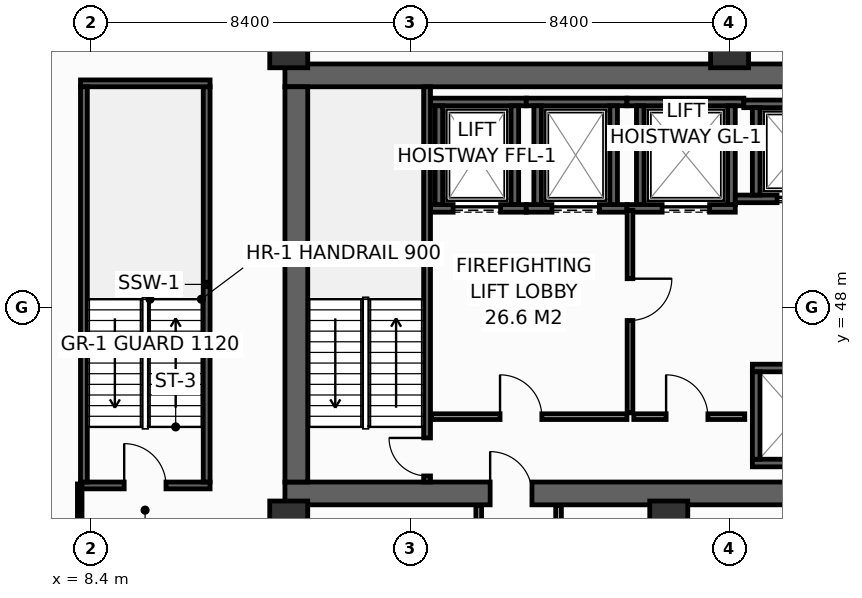
"""IFC4 building model, lengths in metres.
Left out: names, types, materials, properties, quantities, classifications, styles, units other than length and angle.
Written with IfcOpenShell. Run it as: python <this file> out.ifc"""

import sys

from ifc_helpers import new_model, si_unit, direction, frame, frame_2d, origin, origin_2d, place, context, subcontext, project, spatial, rectangle, hollow_rectangle, extrude, element, fill, save


model = new_model("IFC4")
c1 = context("Model", 3, precision=1e-05, world=origin(), true_north=direction((0.0, 1.0)))
c2 = subcontext(c1, "Body", "Model", "MODEL_VIEW")
j1 = project(units=[si_unit("LENGTHUNIT", "METRE"), si_unit("PLANEANGLEUNIT", "RADIAN")], contexts=[c1])
p1 = place(None, origin())
s1 = spatial("IfcSite", under=j1, at=p1, CompositionType="ELEMENT")
p2 = place(p1, origin())
s2 = spatial("IfcBuilding", under=s1, at=p2, CompositionType="ELEMENT")
p3 = place(p2, frame((0.0, 0.0, 114.8)))
s3 = spatial("IfcBuildingStorey", under=s2, at=p3, CompositionType="ELEMENT", Elevation=114.8)
p4 = place(p3, frame((13.5, 43.1, 0.0), z_axis=(0.0, 0.0, 1.0), x_axis=(1.0, 0.0, 0.0)))
e1 = element("IfcWall", 1, at=p4, inside=s3, PredefinedType="SHEAR", context=c2, shape_type="SweptSolid", body=[
    extrude(rectangle(XDim=32.9, YDim=0.6, at=frame_2d((16.45, 0.0))), origin(), (0.0, 0.0, 1.0), 4.15),
])
p5 = place(p4, frame((5.4, 0.0, 0.0)))
e2 = element("IfcOpeningElement", 2, at=p5, cuts=e1, PredefinedType="OPENING", context=c2, shape_type="SweptSolid", body=[
    extrude(rectangle(XDim=1.1, YDim=2.15, at=frame_2d((0.55, 1.075))), frame((0.0, 0.31, 0.0), z_axis=(0.0, -1.0, 0.0), x_axis=(1.0, 0.0, 0.0)), (0.0, 0.0, 1.0), 0.62),
])
p6 = place(p4, frame((25.6, 0.0, 0.0)))
e3 = element("IfcOpeningElement", 3, at=p6, cuts=e1, PredefinedType="OPENING", context=c2, shape_type="SweptSolid", body=[
    extrude(rectangle(XDim=1.1, YDim=2.15, at=frame_2d((0.55, 1.075))), frame((0.0, 0.31, 0.0), z_axis=(0.0, -1.0, 0.0), x_axis=(1.0, 0.0, 0.0)), (0.0, 0.0, 1.0), 0.62),
])
p7 = place(p3, frame((13.5, 54.1, 0.0), z_axis=(0.0, 0.0, 1.0), x_axis=(1.0, 0.0, 0.0)))
e4 = element("IfcWall", 4, at=p7, inside=s3, PredefinedType="SHEAR", context=c2, shape_type="SweptSolid", body=[
    extrude(rectangle(XDim=32.9, YDim=0.6, at=frame_2d((16.45, 0.0))), origin(), (0.0, 0.0, 1.0), 4.15),
])
p8 = place(p3, frame((13.8, 43.4, 0.0), z_axis=(0.0, 0.0, 1.0), x_axis=(0.0, 1.0, 0.0)))
e5 = element("IfcWall", 5, at=p8, inside=s3, PredefinedType="SHEAR", context=c2, shape_type="SweptSolid", body=[
    extrude(rectangle(XDim=10.4, YDim=0.6, at=frame_2d((5.2, 0.0))), origin(), (0.0, 0.0, 1.0), 4.15),
])
for number, where, z_axis, x_axis in (
    (6, (13.6, 54.8, 0.0), (0.0, 0.0, 1.0), (1.0, 0.0, 0.0)),
    (7, (25.2, 54.8, 0.0), (0.0, 0.0, 1.0), (1.0, 0.0, 0.0)),
    (8, (13.6, 42.4, 0.0), (0.0, 0.0, 1.0), (1.0, 0.0, 0.0)),
    (9, (23.6, 42.4, 0.0), (0.0, 0.0, 1.0), (1.0, 0.0, 0.0)),
):
    element("IfcColumn", number, at=place(p3, frame(where, z_axis=z_axis, x_axis=x_axis)), inside=s3, PredefinedType="COLUMN", context=c2, shape_type="SweptSolid", body=[
        extrude(hollow_rectangle(XDim=1.0, YDim=1.0, WallThickness=0.045, at=origin_2d()), origin(), (0.0, 0.0, 1.0), 4.4),
    ])
p9 = place(p3, frame((17.33, 50.6, 0.0), z_axis=(0.0, 0.0, 1.0), x_axis=(1.0, 0.0, 0.0)))
e10 = element("IfcWall", 10, at=p9, inside=s3, PredefinedType="SHEAR", context=c2, shape_type="SweptSolid", body=[
    extrude(rectangle(XDim=2.52, YDim=0.2, at=frame_2d((1.26, 0.0))), origin(), (0.0, 0.0, 1.0), 4.15),
])
p10 = place(p9, frame((0.595, 0.0, 0.0)))
e11 = element("IfcOpeningElement", 11, at=p10, cuts=e10, PredefinedType="OPENING", context=c2, shape_type="SweptSolid", body=[
    extrude(rectangle(XDim=1.25, YDim=2.3, at=frame_2d((0.625, 1.15))), frame((0.0, 0.11, 0.0), z_axis=(0.0, -1.0, 0.0), x_axis=(1.0, 0.0, 0.0)), (0.0, 0.0, 1.0), 0.22),
])
p11 = place(p3, frame((17.33, 53.4, 0.0), z_axis=(0.0, 0.0, 1.0), x_axis=(1.0, 0.0, 0.0)))
e12 = element("IfcWall", 12, at=p11, inside=s3, PredefinedType="SHEAR", context=c2, shape_type="SweptSolid", body=[
    extrude(rectangle(XDim=2.52, YDim=0.2, at=frame_2d((1.26, 0.0))), origin(), (0.0, 0.0, 1.0), 4.15),
])
for number, where, z_axis, x_axis in (
    (13, (17.55, 50.7, 0.0), (0.0, 0.0, 1.0), (0.0, 1.0, 0.0)),
    (14, (19.55, 50.7, 0.0), (0.0, 0.0, 1.0), (0.0, 1.0, 0.0)),
):
    element("IfcWall", number, at=place(p3, frame(where, z_axis=z_axis, x_axis=x_axis)), inside=s3, PredefinedType="SHEAR", context=c2, shape_type="SweptSolid", body=[
        extrude(rectangle(XDim=2.6, YDim=0.2, at=frame_2d((1.3, 0.0))), origin(), (0.0, 0.0, 1.0), 4.15),
    ])
p12 = place(p3, frame((19.85, 50.6, 0.0), z_axis=(0.0, 0.0, 1.0), x_axis=(1.0, 0.0, 0.0)))
e15 = element("IfcWall", 15, at=p12, inside=s3, PredefinedType="SHEAR", context=c2, shape_type="SweptSolid", body=[
    extrude(rectangle(XDim=2.65, YDim=0.2, at=frame_2d((1.325, 0.0))), origin(), (0.0, 0.0, 1.0), 4.15),
])
p13 = place(p12, frame((0.675, 0.0, 0.0)))
e16 = element("IfcOpeningElement", 16, at=p13, cuts=e15, PredefinedType="OPENING", context=c2, shape_type="SweptSolid", body=[
    extrude(rectangle(XDim=1.25, YDim=2.3, at=frame_2d((0.625, 1.15))), frame((0.0, 0.11, 0.0), z_axis=(0.0, -1.0, 0.0), x_axis=(1.0, 0.0, 0.0)), (0.0, 0.0, 1.0), 0.22),
])
p14 = place(p3, frame((19.85, 53.4, 0.0), z_axis=(0.0, 0.0, 1.0), x_axis=(1.0, 0.0, 0.0)))
e17 = element("IfcWall", 17, at=p14, inside=s3, PredefinedType="SHEAR", context=c2, shape_type="SweptSolid", body=[
    extrude(rectangle(XDim=2.65, YDim=0.2, at=frame_2d((1.325, 0.0))), origin(), (0.0, 0.0, 1.0), 4.15),
])
for number, where, z_axis, x_axis in (
    (18, (20.15, 50.7, 0.0), (0.0, 0.0, 1.0), (0.0, 1.0, 0.0)),
    (19, (22.15, 50.7, 0.0), (0.0, 0.0, 1.0), (0.0, 1.0, 0.0)),
):
    element("IfcWall", number, at=place(p3, frame(where, z_axis=z_axis, x_axis=x_axis)), inside=s3, PredefinedType="SHEAR", context=c2, shape_type="SweptSolid", body=[
        extrude(rectangle(XDim=2.6, YDim=0.2, at=frame_2d((1.3, 0.0))), origin(), (0.0, 0.0, 1.0), 4.15),
    ])
p15 = place(p3, frame((22.5, 50.6, 0.0), z_axis=(0.0, 0.0, 1.0), x_axis=(1.0, 0.0, 0.0)))
e20 = element("IfcWall", 20, at=p15, inside=s3, PredefinedType="SHEAR", context=c2, shape_type="SweptSolid", body=[
    extrude(rectangle(XDim=2.85, YDim=0.2, at=frame_2d((1.425, 0.0))), origin(), (0.0, 0.0, 1.0), 4.15),
])
p16 = place(p15, frame((0.925, 0.0, 0.0)))
e21 = element("IfcOpeningElement", 21, at=p16, cuts=e20, PredefinedType="OPENING", context=c2, shape_type="SweptSolid", body=[
    extrude(rectangle(XDim=1.25, YDim=2.3, at=frame_2d((0.625, 1.15))), frame((0.0, 0.11, 0.0), z_axis=(0.0, -1.0, 0.0), x_axis=(1.0, 0.0, 0.0)), (0.0, 0.0, 1.0), 0.22),
])
p17 = place(p3, frame((22.5, 53.4, 0.0), z_axis=(0.0, 0.0, 1.0), x_axis=(1.0, 0.0, 0.0)))
e22 = element("IfcWall", 22, at=p17, inside=s3, PredefinedType="SHEAR", context=c2, shape_type="SweptSolid", body=[
    extrude(rectangle(XDim=3.075, YDim=0.2, at=frame_2d((1.538, 0.0))), origin(), (0.0, 0.0, 1.0), 4.15),
])
for number, where, z_axis, x_axis in (
    (23, (22.85, 50.7, 0.0), (0.0, 0.0, 1.0), (0.0, 1.0, 0.0)),
    (24, (25.25, 50.7, 0.0), (0.0, 0.0, 1.0), (0.0, 1.0, 0.0)),
):
    element("IfcWall", number, at=place(p3, frame(where, z_axis=z_axis, x_axis=x_axis)), inside=s3, PredefinedType="SHEAR", context=c2, shape_type="SweptSolid", body=[
        extrude(rectangle(XDim=2.6, YDim=0.2, at=frame_2d((1.3, 0.0))), origin(), (0.0, 0.0, 1.0), 4.15),
    ])
p18 = place(p3, frame((25.35, 50.85, 0.0), z_axis=(0.0, 0.0, 1.0), x_axis=(1.0, 0.0, 0.0)))
e25 = element("IfcWall", 25, at=p18, inside=s3, PredefinedType="SHEAR", context=c2, shape_type="SweptSolid", body=[
    extrude(rectangle(XDim=3.025, YDim=0.2, at=frame_2d((1.512, 0.0))), origin(), (0.0, 0.0, 1.0), 4.15),
])
p19 = place(p18, frame((1.1, 0.0, 0.0)))
e26 = element("IfcOpeningElement", 26, at=p19, cuts=e25, PredefinedType="OPENING", context=c2, shape_type="SweptSolid", body=[
    extrude(rectangle(XDim=1.1, YDim=2.2, at=frame_2d((0.55, 1.1))), frame((0.0, 0.11, 0.0), z_axis=(0.0, -1.0, 0.0), x_axis=(1.0, 0.0, 0.0)), (0.0, 0.0, 1.0), 0.22),
])
p20 = place(p3, frame((25.575, 53.35, 0.0), z_axis=(0.0, 0.0, 1.0), x_axis=(1.0, 0.0, 0.0)))
e27 = element("IfcWall", 27, at=p20, inside=s3, PredefinedType="SHEAR", context=c2, shape_type="SweptSolid", body=[
    extrude(rectangle(XDim=2.8, YDim=0.2, at=frame_2d((1.4, 0.0))), origin(), (0.0, 0.0, 1.0), 4.15),
])
p21 = place(p3, frame((25.9, 50.95, 0.0), z_axis=(0.0, 0.0, 1.0), x_axis=(0.0, 1.0, 0.0)))
e28 = element("IfcWall", 28, at=p21, inside=s3, PredefinedType="SHEAR", context=c2, shape_type="SweptSolid", body=[
    extrude(rectangle(XDim=2.3, YDim=0.2, at=frame_2d((1.15, 0.0))), origin(), (0.0, 0.0, 1.0), 4.15),
])
for number, where, z_axis, x_axis in (
    (29, (25.8, 43.9, 0.0), (0.0, 0.0, 1.0), (1.0, 0.0, 0.0)),
    (30, (25.8, 46.4, 0.0), (0.0, 0.0, 1.0), (1.0, 0.0, 0.0)),
):
    element("IfcWall", number, at=place(p3, frame(where, z_axis=z_axis, x_axis=x_axis)), inside=s3, PredefinedType="SHEAR", context=c2, shape_type="SweptSolid", body=[
        extrude(rectangle(XDim=2.575, YDim=0.2, at=frame_2d((1.288, 0.0))), origin(), (0.0, 0.0, 1.0), 4.15),
    ])
p22 = place(p3, frame((25.9, 44.0, 0.0), z_axis=(0.0, 0.0, 1.0), x_axis=(0.0, 1.0, 0.0)))
e31 = element("IfcWall", 31, at=p22, inside=s3, PredefinedType="SHEAR", context=c2, shape_type="SweptSolid", body=[
    extrude(rectangle(XDim=2.3, YDim=0.2, at=frame_2d((1.15, 0.0))), origin(), (0.0, 0.0, 1.0), 4.15),
])
p23 = place(p3, frame((17.24, 43.4, 0.0), z_axis=(0.0, 0.0, 1.0), x_axis=(0.0, 1.0, 0.0)))
e32 = element("IfcWall", 32, at=p23, inside=s3, PredefinedType="SHEAR", context=c2, shape_type="SweptSolid", body=[
    extrude(rectangle(XDim=10.4, YDim=0.18, at=frame_2d((5.2, 0.0))), origin(), (0.0, 0.0, 1.0), 4.15),
])
p24 = place(p23, frame((0.16, 0.0, 0.0)))
e33 = element("IfcOpeningElement", 33, at=p24, cuts=e32, PredefinedType="OPENING", context=c2, shape_type="SweptSolid", body=[
    extrude(rectangle(XDim=1.0, YDim=2.15, at=frame_2d((0.5, 1.075))), frame((0.0, 0.1, 0.0), z_axis=(0.0, -1.0, 0.0), x_axis=(1.0, 0.0, 0.0)), (0.0, 0.0, 1.0), 0.2),
])
p25 = place(p3, frame((8.12, 43.31, 0.0), z_axis=(0.0, 0.0, 1.0), x_axis=(1.0, 0.0, 0.0)))
e34 = element("IfcWall", 34, at=p25, inside=s3, PredefinedType="SHEAR", context=c2, shape_type="SweptSolid", body=[
    extrude(rectangle(XDim=3.41, YDim=0.18, at=frame_2d((1.705, 0.0))), origin(), (0.0, 0.0, 1.0), 4.15),
])
p26 = place(p25, frame((1.15, 0.0, 0.0)))
e35 = element("IfcOpeningElement", 35, at=p26, cuts=e34, PredefinedType="OPENING", context=c2, shape_type="SweptSolid", body=[
    extrude(rectangle(XDim=1.1, YDim=2.15, at=frame_2d((0.55, 1.075))), frame((0.0, 0.1, 0.0), z_axis=(0.0, -1.0, 0.0), x_axis=(1.0, 0.0, 0.0)), (0.0, 0.0, 1.0), 0.2),
])
p27 = place(p3, frame((11.44, 43.4, 0.0), z_axis=(0.0, 0.0, 1.0), x_axis=(0.0, 1.0, 0.0)))
e36 = element("IfcWall", 36, at=p27, inside=s3, PredefinedType="SHEAR", context=c2, shape_type="SweptSolid", body=[
    extrude(rectangle(XDim=10.4, YDim=0.18, at=frame_2d((5.2, 0.0))), origin(), (0.0, 0.0, 1.0), 4.15),
])
p28 = place(p3, frame((11.53, 53.89, 0.0), z_axis=(0.0, 0.0, 1.0), x_axis=(-1.0, 0.0, 0.0)))
e37 = element("IfcWall", 37, at=p28, inside=s3, PredefinedType="SHEAR", context=c2, shape_type="SweptSolid", body=[
    extrude(rectangle(XDim=3.41, YDim=0.18, at=frame_2d((1.705, 0.0))), origin(), (0.0, 0.0, 1.0), 4.15),
])
p29 = place(p3, frame((8.21, 53.8, 0.0), z_axis=(0.0, 0.0, 1.0), x_axis=(0.0, -1.0, 0.0)))
e38 = element("IfcWall", 38, at=p29, inside=s3, PredefinedType="SHEAR", context=c2, shape_type="SweptSolid", body=[
    extrude(rectangle(XDim=10.4, YDim=0.18, at=frame_2d((5.2, 0.0))), origin(), (0.0, 0.0, 1.0), 4.15),
])
p30 = place(p3, frame((17.36, 45.12, 0.0), z_axis=(0.0, 0.0, 1.0), x_axis=(1.0, 0.0, 0.0)))
e39 = element("IfcWall", 39, at=p30, inside=s3, PredefinedType="PARTITIONING", context=c2, shape_type="SweptSolid", body=[
    extrude(rectangle(XDim=5.14, YDim=0.15, at=frame_2d((2.57, 0.0))), origin(), (0.0, 0.0, 1.0), 4.15),
])
p31 = place(p30, frame((1.8, 0.0, 0.0)))
e40 = element("IfcOpeningElement", 40, at=p31, cuts=e39, PredefinedType="OPENING", context=c2, shape_type="SweptSolid", body=[
    extrude(rectangle(XDim=1.1, YDim=2.15, at=frame_2d((0.55, 1.075))), frame((0.0, 0.085, 0.0), z_axis=(0.0, -1.0, 0.0), x_axis=(1.0, 0.0, 0.0)), (0.0, 0.0, 1.0), 0.17),
])
p32 = place(p3, frame((22.58, 50.55, 0.0), z_axis=(0.0, 0.0, 1.0), x_axis=(0.0, -1.0, 0.0)))
e41 = element("IfcWall", 41, at=p32, inside=s3, PredefinedType="PARTITIONING", context=c2, shape_type="SweptSolid", body=[
    extrude(rectangle(XDim=5.33, YDim=0.15, at=frame_2d((2.665, 0.0))), origin(), (0.0, 0.0, 1.0), 4.15),
])
p33 = place(p32, frame((1.8, 0.0, 0.0)))
e42 = element("IfcOpeningElement", 42, at=p33, cuts=e41, PredefinedType="OPENING", context=c2, shape_type="SweptSolid", body=[
    extrude(rectangle(XDim=1.1, YDim=2.15, at=frame_2d((0.55, 1.075))), frame((0.0, 0.085, 0.0), z_axis=(0.0, -1.0, 0.0), x_axis=(1.0, 0.0, 0.0)), (0.0, 0.0, 1.0), 0.17),
])
p34 = place(p3, frame((22.68, 45.12, 0.0), z_axis=(0.0, 0.0, 1.0), x_axis=(1.0, 0.0, 0.0)))
e43 = element("IfcWall", 43, at=p34, inside=s3, PredefinedType="PARTITIONING", context=c2, shape_type="SweptSolid", body=[
    extrude(rectangle(XDim=2.92, YDim=0.15, at=frame_2d((1.46, 0.0))), origin(), (0.0, 0.0, 1.0), 4.15),
])
p35 = place(p34, frame((0.85, 0.0, 0.0)))
e44 = element("IfcOpeningElement", 44, at=p35, cuts=e43, PredefinedType="OPENING", context=c2, shape_type="SweptSolid", body=[
    extrude(rectangle(XDim=1.1, YDim=2.15, at=frame_2d((0.55, 1.075))), frame((0.0, 0.085, 0.0), z_axis=(0.0, -1.0, 0.0), x_axis=(1.0, 0.0, 0.0)), (0.0, 0.0, 1.0), 0.17),
])
p36 = place(p3, frame((13.8, 40.93, 0.0), z_axis=(0.0, 0.0, 1.0), x_axis=(0.0, 1.0, 0.0)))
e45 = element("IfcWall", 45, at=p36, inside=s3, PredefinedType="PARTITIONING", context=c2, shape_type="SweptSolid", body=[
    extrude(rectangle(XDim=1.85, YDim=0.12, at=frame_2d((0.925, 0.0))), origin(), (0.0, 0.0, 1.0), 4.15),
])
p37 = place(p3, frame((8.1, 40.85, 0.0), z_axis=(0.0, 0.0, 1.0), x_axis=(0.0, 1.0, 0.0)))
e46 = element("IfcWall", 46, at=p37, inside=s3, PredefinedType="PARTITIONING", context=c2, shape_type="SweptSolid", body=[
    extrude(rectangle(XDim=2.5, YDim=0.12, at=frame_2d((1.25, 0.0))), origin(), (0.0, 0.0, 1.0), 3.335),
])
for number, where, z_axis, x_axis in (
    (47, (18.6, 40.85, 0.0), (0.0, 0.0, 1.0), (0.0, 1.0, 0.0)),
    (48, (20.7, 40.85, 0.0), (0.0, 0.0, 1.0), (0.0, 1.0, 0.0)),
):
    element("IfcWall", number, at=place(p3, frame(where, z_axis=z_axis, x_axis=x_axis)), inside=s3, PredefinedType="PARTITIONING", context=c2, shape_type="SweptSolid", body=[
        extrude(rectangle(XDim=1.93, YDim=0.15, at=frame_2d((0.965, 0.0))), origin(), (0.0, 0.0, 1.0), 4.15),
    ])
p38 = place(p10, origin())
e49 = element("IfcDoor", 49, at=p38, inside=s3, OperationType="SLIDING_TO_LEFT", PredefinedType="DOOR", context=c2, shape_type="SweptSolid", body=[
    extrude(rectangle(XDim=1.25, YDim=2.3, at=frame_2d((0.625, 1.15))), frame((0.0, 0.025, 0.0), z_axis=(0.0, -1.0, 0.0), x_axis=(1.0, 0.0, 0.0)), (0.0, 0.0, 1.0), 0.05),
])
fill(e11, e49)
p39 = place(p13, origin())
e50 = element("IfcDoor", 50, at=p39, inside=s3, OperationType="SLIDING_TO_LEFT", PredefinedType="DOOR", context=c2, shape_type="SweptSolid", body=[
    extrude(rectangle(XDim=1.25, YDim=2.3, at=frame_2d((0.625, 1.15))), frame((0.0, 0.025, 0.0), z_axis=(0.0, -1.0, 0.0), x_axis=(1.0, 0.0, 0.0)), (0.0, 0.0, 1.0), 0.05),
])
fill(e16, e50)
p40 = place(p16, origin())
e51 = element("IfcDoor", 51, at=p40, inside=s3, OperationType="SLIDING_TO_LEFT", PredefinedType="DOOR", context=c2, shape_type="SweptSolid", body=[
    extrude(rectangle(XDim=1.25, YDim=2.3, at=frame_2d((0.625, 1.15))), frame((0.0, 0.025, 0.0), z_axis=(0.0, -1.0, 0.0), x_axis=(1.0, 0.0, 0.0)), (0.0, 0.0, 1.0), 0.05),
])
fill(e21, e51)
p41 = place(p19, origin())
e52 = element("IfcDoor", 52, at=p41, inside=s3, OperationType="SLIDING_TO_LEFT", PredefinedType="DOOR", context=c2, shape_type="SweptSolid", body=[
    extrude(rectangle(XDim=1.1, YDim=2.2, at=frame_2d((0.55, 1.1))), frame((0.0, 0.025, 0.0), z_axis=(0.0, -1.0, 0.0), x_axis=(1.0, 0.0, 0.0)), (0.0, 0.0, 1.0), 0.05),
])
fill(e26, e52)
p42 = place(p24, origin())
e53 = element("IfcDoor", 53, at=p42, inside=s3, OperationType="SINGLE_SWING_RIGHT", PredefinedType="DOOR", context=c2, shape_type="SweptSolid", body=[
    extrude(rectangle(XDim=1.0, YDim=2.15, at=frame_2d((0.5, 1.075))), frame((0.0, 0.025, 0.0), z_axis=(0.0, -1.0, 0.0), x_axis=(1.0, 0.0, 0.0)), (0.0, 0.0, 1.0), 0.05),
])
fill(e33, e53)
p43 = place(p26, origin())
e54 = element("IfcDoor", 54, at=p43, inside=s3, OperationType="SINGLE_SWING_LEFT", PredefinedType="DOOR", context=c2, shape_type="SweptSolid", body=[
    extrude(rectangle(XDim=1.1, YDim=2.15, at=frame_2d((0.55, 1.075))), frame((0.0, 0.025, 0.0), z_axis=(0.0, -1.0, 0.0), x_axis=(1.0, 0.0, 0.0)), (0.0, 0.0, 1.0), 0.05),
])
fill(e35, e54)
p44 = place(p31, origin())
e55 = element("IfcDoor", 55, at=p44, inside=s3, OperationType="SINGLE_SWING_LEFT", PredefinedType="DOOR", context=c2, shape_type="SweptSolid", body=[
    extrude(rectangle(XDim=1.1, YDim=2.15, at=frame_2d((0.55, 1.075))), frame((0.0, 0.025, 0.0), z_axis=(0.0, -1.0, 0.0), x_axis=(1.0, 0.0, 0.0)), (0.0, 0.0, 1.0), 0.05),
])
fill(e40, e55)
p45 = place(p33, origin())
e56 = element("IfcDoor", 56, at=p45, inside=s3, OperationType="SINGLE_SWING_LEFT", PredefinedType="DOOR", context=c2, shape_type="SweptSolid", body=[
    extrude(rectangle(XDim=1.1, YDim=2.15, at=frame_2d((0.55, 1.075))), frame((0.0, 0.025, 0.0), z_axis=(0.0, -1.0, 0.0), x_axis=(1.0, 0.0, 0.0)), (0.0, 0.0, 1.0), 0.05),
])
fill(e42, e56)
p46 = place(p35, origin())
e57 = element("IfcDoor", 57, at=p46, inside=s3, OperationType="SINGLE_SWING_LEFT", PredefinedType="DOOR", context=c2, shape_type="SweptSolid", body=[
    extrude(rectangle(XDim=1.1, YDim=2.15, at=frame_2d((0.55, 1.075))), frame((0.0, 0.025, 0.0), z_axis=(0.0, -1.0, 0.0), x_axis=(1.0, 0.0, 0.0)), (0.0, 0.0, 1.0), 0.05),
])
fill(e44, e57)
p47 = place(p5, origin())
e58 = element("IfcDoor", 58, at=p47, inside=s3, OperationType="SINGLE_SWING_LEFT", PredefinedType="DOOR", context=c2, shape_type="SweptSolid", body=[
    extrude(rectangle(XDim=1.1, YDim=2.15, at=frame_2d((0.55, 1.075))), frame((0.0, 0.025, 0.0), z_axis=(0.0, -1.0, 0.0), x_axis=(1.0, 0.0, 0.0)), (0.0, 0.0, 1.0), 0.05),
])
fill(e2, e58)
save(model, sys.argv[1])
